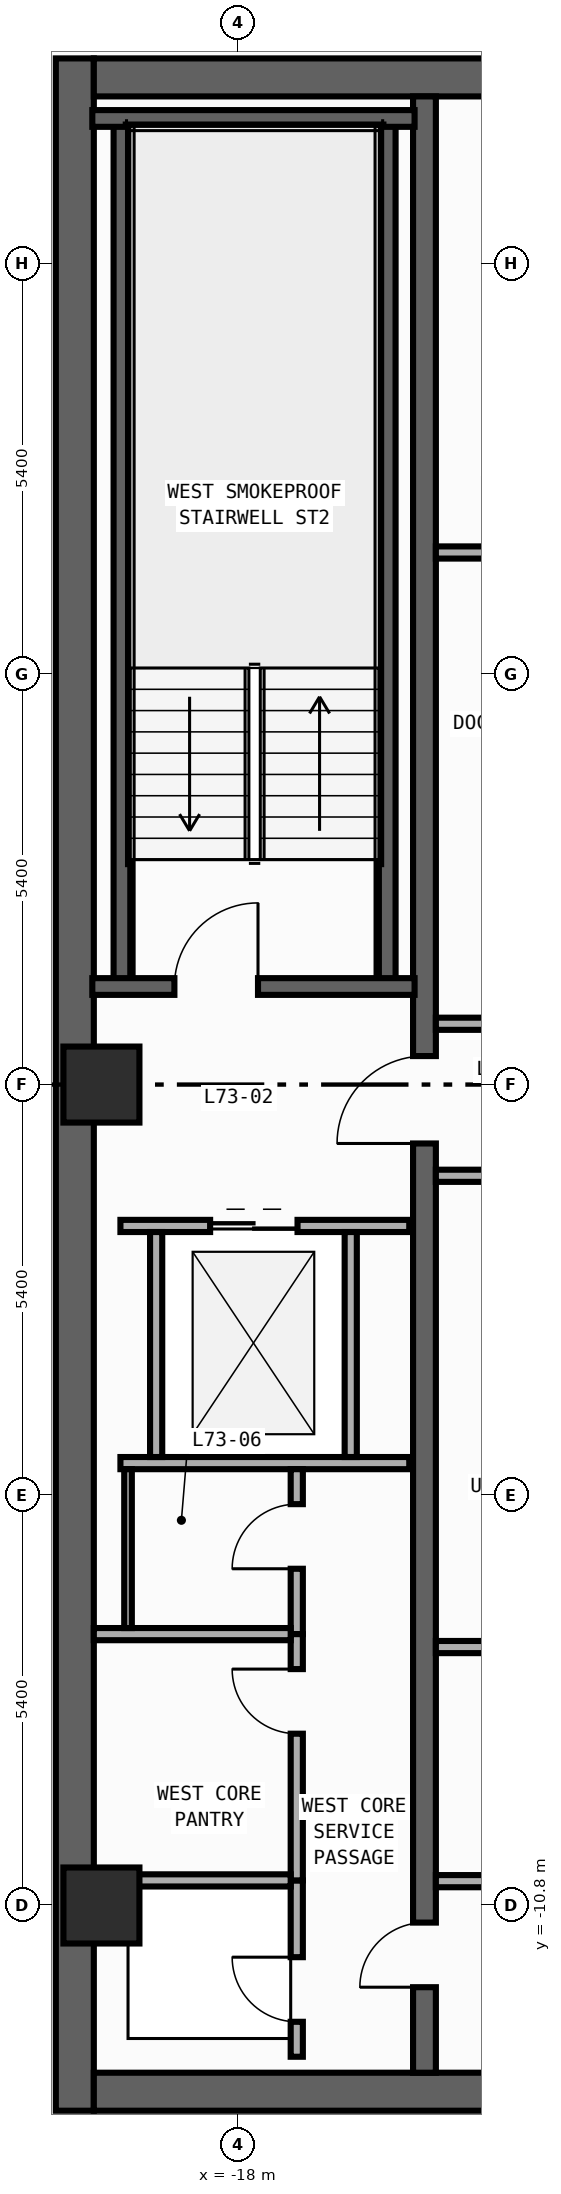
"""IFC4 building model, lengths in metres.
Left out: names, types, materials, properties, quantities, classifications, styles, units other than length and angle.
Written with IfcOpenShell. Run it as: python <this file> out.ifc"""

import sys

from ifc_helpers import new_model, si_unit, direction, frame, frame_2d, origin, origin_2d, place, context, subcontext, project, spatial, rectangle, circle, extrude, element, fill, save


model = new_model("IFC4")
c1 = context("Model", 3, precision=1e-05, world=origin(), true_north=direction((0.0, 1.0)))
c2 = subcontext(c1, "Body", "Model", "MODEL_VIEW")
j1 = project(units=[si_unit("LENGTHUNIT", "METRE"), si_unit("PLANEANGLEUNIT", "RADIAN")], contexts=[c1])
p1 = place(None, origin())
s1 = spatial("IfcSite", under=j1, at=p1, CompositionType="ELEMENT")
p2 = place(p1, origin())
s2 = spatial("IfcBuilding", under=s1, at=p2, CompositionType="ELEMENT")
p3 = place(p2, frame((0.0, 0.0, 304.2)))
s3 = spatial("IfcBuildingStorey", under=s2, at=p3, CompositionType="ELEMENT", Elevation=304.2)
p4 = place(p3, frame((-20.15, -13.5, 0.0), z_axis=(0.0, 0.0, 1.0), x_axis=(0.0, 1.0, 0.0)))
e1 = element("IfcWall", 1, at=p4, inside=s3, PredefinedType="SHEAR", context=c2, shape_type="SweptSolid", body=[
    extrude(rectangle(XDim=27.0, YDim=0.5, at=frame_2d((13.5, 0.0))), origin(), (0.0, 0.0, 1.0), 3.54),
])
for number, where, z_axis, x_axis in (
    (2, (-19.9, -13.25, 0.0), (0.0, 0.0, 1.0), (1.0, 0.0, 0.0)),
    (3, (-19.9, 13.25, 0.0), (0.0, 0.0, 1.0), (1.0, 0.0, 0.0)),
):
    element("IfcWall", number, at=place(p3, frame(where, z_axis=z_axis, x_axis=x_axis)), inside=s3, PredefinedType="SHEAR", context=c2, shape_type="SweptSolid", body=[
        extrude(rectangle(XDim=7.4, YDim=0.5, at=frame_2d((3.7, 0.0))), origin(), (0.0, 0.0, 1.0), 3.54),
    ])
p5 = place(p3, frame((-15.55, -13.0, 0.0), z_axis=(0.0, 0.0, 1.0), x_axis=(0.0, 1.0, 0.0)))
e4 = element("IfcWall", 4, at=p5, inside=s3, PredefinedType="SHEAR", context=c2, shape_type="SweptSolid", body=[
    extrude(rectangle(XDim=26.0, YDim=0.3, at=frame_2d((13.0, 0.0))), origin(), (0.0, 0.0, 1.0), 3.54),
])
p6 = place(p5, frame((12.225, 0.0, 0.0)))
e5 = element("IfcOpeningElement", 5, at=p6, cuts=e4, PredefinedType="OPENING", context=c2, shape_type="SweptSolid", body=[
    extrude(rectangle(XDim=1.15, YDim=2.2, at=frame_2d((0.575, 1.1))), frame((0.0, 0.16, 0.0), z_axis=(0.0, -1.0, 0.0), x_axis=(1.0, 0.0, 0.0)), (0.0, 0.0, 1.0), 0.32),
])
p7 = place(p5, frame((1.125, 0.0, 0.0)))
e6 = element("IfcOpeningElement", 6, at=p7, cuts=e4, PredefinedType="OPENING", context=c2, shape_type="SweptSolid", body=[
    extrude(rectangle(XDim=0.85, YDim=2.1, at=frame_2d((0.425, 1.05))), frame((0.0, 0.16, 0.0), z_axis=(0.0, -1.0, 0.0), x_axis=(1.0, 0.0, 0.0)), (0.0, 0.0, 1.0), 0.32),
])
for number, where, z_axis, x_axis in (
    (7, (-16.04, 1.29, 0.0), (0.0, 0.0, 1.0), (0.0, 1.0, 0.0)),
    (8, (-19.53, 1.29, 0.0), (0.0, 0.0, 1.0), (0.0, 1.0, 0.0)),
):
    element("IfcWall", number, at=place(p3, frame(where, z_axis=z_axis, x_axis=x_axis)), inside=s3, PredefinedType="SHEAR", context=c2, shape_type="SweptSolid", body=[
        extrude(rectangle(XDim=11.42, YDim=0.22, at=frame_2d((5.71, 0.0))), origin(), (0.0, 0.0, 1.0), 3.54),
    ])
p8 = place(p3, frame((-19.92, 12.71, 0.0), z_axis=(0.0, 0.0, 1.0), x_axis=(1.0, 0.0, 0.0)))
e9 = element("IfcWall", 9, at=p8, inside=s3, PredefinedType="SHEAR", context=c2, shape_type="SweptSolid", body=[
    extrude(rectangle(XDim=4.24, YDim=0.22, at=frame_2d((2.12, 0.0))), origin(), (0.0, 0.0, 1.0), 3.54),
])
p9 = place(p3, frame((-19.92, 1.29, 0.0), z_axis=(0.0, 0.0, 1.0), x_axis=(1.0, 0.0, 0.0)))
e10 = element("IfcWall", 10, at=p9, inside=s3, PredefinedType="SHEAR", context=c2, shape_type="SweptSolid", body=[
    extrude(rectangle(XDim=4.24, YDim=0.22, at=frame_2d((2.12, 0.0))), origin(), (0.0, 0.0, 1.0), 3.54),
])
p10 = place(p9, frame((1.08, 0.0, 0.0)))
e11 = element("IfcOpeningElement", 11, at=p10, cuts=e10, PredefinedType="OPENING", context=c2, shape_type="SweptSolid", body=[
    extrude(rectangle(XDim=1.1, YDim=2.2, at=frame_2d((0.55, 1.1))), frame((0.0, 0.12, 0.0), z_axis=(0.0, -1.0, 0.0), x_axis=(1.0, 0.0, 0.0)), (0.0, 0.0, 1.0), 0.24),
])
for number, where, z_axis, x_axis in (
    (12, (-19.8, -10.8, 0.0), (0.0, 0.0, 1.0), (1.0, 0.0, 0.0)),
    (13, (-19.8, 0.0, 0.0), (0.0, 0.0, 1.0), (1.0, 0.0, 0.0)),
):
    element("IfcColumn", number, at=place(p3, frame(where, z_axis=z_axis, x_axis=x_axis)), inside=s3, PredefinedType="COLUMN", context=c2, shape_type="SweptSolid", body=[
        extrude(circle(Radius=0.5, at=origin_2d()), origin(), (0.0, 0.0, 1.0), 3.8),
    ])
p11 = place(p3, frame((-19.55, -1.86, 0.0), z_axis=(0.0, 0.0, 1.0), x_axis=(1.0, 0.0, 0.0)))
e14 = element("IfcWall", 14, at=p11, inside=s3, PredefinedType="STANDARD", context=c2, shape_type="SweptSolid", body=[
    extrude(rectangle(XDim=3.8, YDim=0.16, at=frame_2d((1.9, 0.0))), origin(), (0.0, 0.0, 1.0), 3.54),
])
p12 = place(p11, frame((1.18, 0.0, 0.0)))
e15 = element("IfcOpeningElement", 15, at=p12, cuts=e14, PredefinedType="OPENING", context=c2, shape_type="SweptSolid", body=[
    extrude(rectangle(XDim=1.15, YDim=2.2, at=frame_2d((0.575, 1.1))), frame((0.0, 0.09, 0.0), z_axis=(0.0, -1.0, 0.0), x_axis=(1.0, 0.0, 0.0)), (0.0, 0.0, 1.0), 0.18),
])
p13 = place(p3, frame((-19.55, -4.98, 0.0), z_axis=(0.0, 0.0, 1.0), x_axis=(1.0, 0.0, 0.0)))
e16 = element("IfcWall", 16, at=p13, inside=s3, PredefinedType="STANDARD", context=c2, shape_type="SweptSolid", body=[
    extrude(rectangle(XDim=3.8, YDim=0.16, at=frame_2d((1.9, 0.0))), origin(), (0.0, 0.0, 1.0), 3.54),
])
for number, where, z_axis, x_axis in (
    (17, (-19.08, -4.9, 0.0), (0.0, 0.0, 1.0), (0.0, 1.0, 0.0)),
    (18, (-16.52, -4.9, 0.0), (0.0, 0.0, 1.0), (0.0, 1.0, 0.0)),
):
    element("IfcWall", number, at=place(p3, frame(where, z_axis=z_axis, x_axis=x_axis)), inside=s3, PredefinedType="STANDARD", context=c2, shape_type="SweptSolid", body=[
        extrude(rectangle(XDim=2.96, YDim=0.16, at=frame_2d((1.48, 0.0))), origin(), (0.0, 0.0, 1.0), 3.54),
    ])
for number, where, z_axis, x_axis in (
    (19, (-15.4, 0.8, 0.0), (0.0, 0.0, 1.0), (1.0, 0.0, 0.0)),
    (20, (-15.4, -1.2, 0.0), (0.0, 0.0, 1.0), (1.0, 0.0, 0.0)),
    (21, (-15.4, -10.48, 0.0), (0.0, 0.0, 1.0), (1.0, 0.0, 0.0)),
):
    element("IfcWall", number, at=place(p3, frame(where, z_axis=z_axis, x_axis=x_axis)), inside=s3, PredefinedType="STANDARD", context=c2, shape_type="SweptSolid", body=[
        extrude(rectangle(XDim=2.6, YDim=0.16, at=frame_2d((1.3, 0.0))), origin(), (0.0, 0.0, 1.0), 3.54),
    ])
p14 = place(p3, frame((-17.23, -12.79, 0.0), z_axis=(0.0, 0.0, 1.0), x_axis=(0.0, 1.0, 0.0)))
e22 = element("IfcWall", 22, at=p14, inside=s3, PredefinedType="PARTITIONING", context=c2, shape_type="SweptSolid", body=[
    extrude(rectangle(XDim=2.32, YDim=0.16, at=frame_2d((1.16, 0.0))), origin(), (0.0, 0.0, 1.0), 3.54),
])
p15 = place(p14, frame((0.46, 0.0, 0.0)))
e23 = element("IfcOpeningElement", 23, at=p15, cuts=e22, PredefinedType="OPENING", context=c2, shape_type="SweptSolid", body=[
    extrude(rectangle(XDim=0.85, YDim=2.1, at=frame_2d((0.425, 1.05))), frame((0.0, 0.09, 0.0), z_axis=(0.0, -1.0, 0.0), x_axis=(1.0, 0.0, 0.0)), (0.0, 0.0, 1.0), 0.18),
])
p16 = place(p3, frame((-17.23, -7.23, 0.0), z_axis=(0.0, 0.0, 1.0), x_axis=(0.0, 1.0, 0.0)))
e24 = element("IfcWall", 24, at=p16, inside=s3, PredefinedType="PARTITIONING", context=c2, shape_type="SweptSolid", body=[
    extrude(rectangle(XDim=2.17, YDim=0.16, at=frame_2d((1.085, 0.0))), origin(), (0.0, 0.0, 1.0), 3.54),
])
p17 = place(p16, frame((0.86, 0.0, 0.0)))
e25 = element("IfcOpeningElement", 25, at=p17, cuts=e24, PredefinedType="OPENING", context=c2, shape_type="SweptSolid", body=[
    extrude(rectangle(XDim=0.85, YDim=2.1, at=frame_2d((0.425, 1.05))), frame((0.0, 0.09, 0.0), z_axis=(0.0, -1.0, 0.0), x_axis=(1.0, 0.0, 0.0)), (0.0, 0.0, 1.0), 0.18),
])
p18 = place(p3, frame((-17.23, -10.47, 0.0), z_axis=(0.0, 0.0, 1.0), x_axis=(0.0, 1.0, 0.0)))
e26 = element("IfcWall", 26, at=p18, inside=s3, PredefinedType="PARTITIONING", context=c2, shape_type="SweptSolid", body=[
    extrude(rectangle(XDim=3.24, YDim=0.16, at=frame_2d((1.62, 0.0))), origin(), (0.0, 0.0, 1.0), 3.54),
])
p19 = place(p18, frame((1.93, 0.0, 0.0)))
e27 = element("IfcOpeningElement", 27, at=p19, cuts=e26, PredefinedType="OPENING", context=c2, shape_type="SweptSolid", body=[
    extrude(rectangle(XDim=0.85, YDim=2.1, at=frame_2d((0.425, 1.05))), frame((0.0, 0.09, 0.0), z_axis=(0.0, -1.0, 0.0), x_axis=(1.0, 0.0, 0.0)), (0.0, 0.0, 1.0), 0.18),
])
p20 = place(p3, frame((-19.75, -10.47, 0.0), z_axis=(0.0, 0.0, 1.0), x_axis=(1.0, 0.0, 0.0)))
e28 = element("IfcWall", 28, at=p20, inside=s3, PredefinedType="PARTITIONING", context=c2, shape_type="SweptSolid", body=[
    extrude(rectangle(XDim=2.44, YDim=0.16, at=frame_2d((1.22, 0.0))), origin(), (0.0, 0.0, 1.0), 3.54),
])
p21 = place(p3, frame((-19.9, -7.23, 0.0), z_axis=(0.0, 0.0, 1.0), x_axis=(1.0, 0.0, 0.0)))
e29 = element("IfcWall", 29, at=p21, inside=s3, PredefinedType="PARTITIONING", context=c2, shape_type="SweptSolid", body=[
    extrude(rectangle(XDim=2.59, YDim=0.16, at=frame_2d((1.295, 0.0))), origin(), (0.0, 0.0, 1.0), 3.54),
])
for number, where, z_axis, x_axis in (
    (30, (-15.4, 7.0, 0.0), (0.0, 0.0, 1.0), (1.0, 0.0, 0.0)),
    (31, (-15.4, -7.4, 0.0), (0.0, 0.0, 1.0), (1.0, 0.0, 0.0)),
):
    element("IfcWall", number, at=place(p3, frame(where, z_axis=z_axis, x_axis=x_axis)), inside=s3, PredefinedType="PARTITIONING", context=c2, shape_type="SweptSolid", body=[
        extrude(rectangle(XDim=2.9, YDim=0.16, at=frame_2d((1.45, 0.0))), origin(), (0.0, 0.0, 1.0), 3.54),
    ])
p22 = place(p3, frame((-19.45, -7.15, 0.0), z_axis=(0.0, 0.0, 1.0), x_axis=(0.0, 1.0, 0.0)))
e32 = element("IfcWall", 32, at=p22, inside=s3, PredefinedType="PARTITIONING", context=c2, shape_type="SweptSolid", body=[
    extrude(rectangle(XDim=2.09, YDim=0.1, at=frame_2d((1.045, 0.0))), origin(), (0.0, 0.0, 1.0), 3.54),
])
p23 = place(p10, origin())
e33 = element("IfcDoor", 33, at=p23, inside=s3, OperationType="SINGLE_SWING_RIGHT", PredefinedType="DOOR", context=c2, shape_type="SweptSolid", body=[
    extrude(rectangle(XDim=1.1, YDim=2.2, at=frame_2d((0.55, 1.1))), frame((0.0, 0.025, 0.0), z_axis=(0.0, -1.0, 0.0), x_axis=(1.0, 0.0, 0.0)), (0.0, 0.0, 1.0), 0.05),
])
fill(e11, e33)
p24 = place(p6, origin())
e34 = element("IfcDoor", 34, at=p24, inside=s3, OperationType="SINGLE_SWING_LEFT", PredefinedType="DOOR", context=c2, shape_type="SweptSolid", body=[
    extrude(rectangle(XDim=1.15, YDim=2.2, at=frame_2d((0.575, 1.1))), frame((0.0, 0.025, 0.0), z_axis=(0.0, -1.0, 0.0), x_axis=(1.0, 0.0, 0.0)), (0.0, 0.0, 1.0), 0.05),
])
fill(e5, e34)
p25 = place(p7, origin())
e35 = element("IfcDoor", 35, at=p25, inside=s3, OperationType="SINGLE_SWING_LEFT", PredefinedType="DOOR", context=c2, shape_type="SweptSolid", body=[
    extrude(rectangle(XDim=0.85, YDim=2.1, at=frame_2d((0.425, 1.05))), frame((0.0, 0.025, 0.0), z_axis=(0.0, -1.0, 0.0), x_axis=(1.0, 0.0, 0.0)), (0.0, 0.0, 1.0), 0.05),
])
fill(e6, e35)
p26 = place(p12, origin())
e36 = element("IfcDoor", 36, at=p26, inside=s3, OperationType="DOUBLE_DOOR_SLIDING", PredefinedType="DOOR", context=c2, shape_type="SweptSolid", body=[
    extrude(rectangle(XDim=1.15, YDim=2.2, at=frame_2d((0.575, 1.1))), frame((0.0, 0.025, 0.0), z_axis=(0.0, -1.0, 0.0), x_axis=(1.0, 0.0, 0.0)), (0.0, 0.0, 1.0), 0.05),
])
fill(e15, e36)
p27 = place(p15, origin())
e37 = element("IfcDoor", 37, at=p27, inside=s3, OperationType="SINGLE_SWING_RIGHT", PredefinedType="DOOR", context=c2, shape_type="SweptSolid", body=[
    extrude(rectangle(XDim=0.85, YDim=2.1, at=frame_2d((0.425, 1.05))), frame((0.0, 0.025, 0.0), z_axis=(0.0, -1.0, 0.0), x_axis=(1.0, 0.0, 0.0)), (0.0, 0.0, 1.0), 0.05),
])
fill(e23, e37)
p28 = place(p17, origin())
e38 = element("IfcDoor", 38, at=p28, inside=s3, OperationType="SINGLE_SWING_LEFT", PredefinedType="DOOR", context=c2, shape_type="SweptSolid", body=[
    extrude(rectangle(XDim=0.85, YDim=2.1, at=frame_2d((0.425, 1.05))), frame((0.0, 0.025, 0.0), z_axis=(0.0, -1.0, 0.0), x_axis=(1.0, 0.0, 0.0)), (0.0, 0.0, 1.0), 0.05),
])
fill(e25, e38)
p29 = place(p19, origin())
e39 = element("IfcDoor", 39, at=p29, inside=s3, OperationType="SINGLE_SWING_RIGHT", PredefinedType="DOOR", context=c2, shape_type="SweptSolid", body=[
    extrude(rectangle(XDim=0.85, YDim=2.1, at=frame_2d((0.425, 1.05))), frame((0.0, 0.025, 0.0), z_axis=(0.0, -1.0, 0.0), x_axis=(1.0, 0.0, 0.0)), (0.0, 0.0, 1.0), 0.05),
])
fill(e27, e39)
save(model, sys.argv[1])
